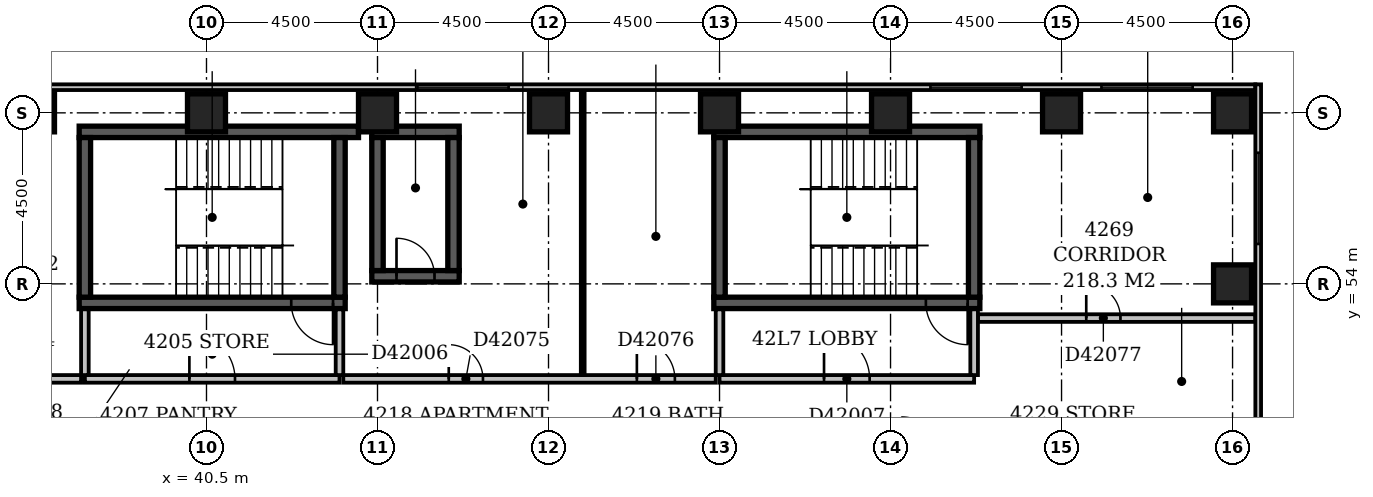
"""IFC4 building model, lengths in metres.
Left out: names, types, materials, properties, quantities, classifications, styles, units other than length and angle.
Written with IfcOpenShell. Run it as: python <this file> out.ifc"""

import sys

from ifc_helpers import new_model, si_unit, direction, frame, frame_2d, origin, origin_2d, place, context, subcontext, project, spatial, rectangle, extrude, element, fill, save


model = new_model("IFC4")
c1 = context("Model", 3, precision=1e-05, world=origin(), true_north=direction((0.0, 1.0)))
c2 = subcontext(c1, "Body", "Model", "MODEL_VIEW")
j1 = project(units=[si_unit("LENGTHUNIT", "METRE"), si_unit("PLANEANGLEUNIT", "RADIAN")], contexts=[c1])
p1 = place(None, origin())
s1 = spatial("IfcSite", under=j1, at=p1, CompositionType="ELEMENT")
p2 = place(p1, origin())
s2 = spatial("IfcBuilding", under=s1, at=p2, CompositionType="ELEMENT")
p3 = place(p2, frame((0.0, 0.0, 166.4)))
s3 = spatial("IfcBuildingStorey", under=s2, at=p3, CompositionType="ELEMENT", Elevation=166.4)
p4 = place(p3, frame((37.15, 53.5, -0.3), z_axis=(0.0, 0.0, 1.0), x_axis=(1.0, 0.0, 0.0)))
e1 = element("IfcWall", 1, at=p4, inside=s3, PredefinedType="SHEAR", context=c2, shape_type="SweptSolid", body=[
    extrude(rectangle(XDim=7.0, YDim=0.3, at=frame_2d((3.5, 0.0))), origin(), (0.0, 0.0, 1.0), 3.6),
])
p5 = place(p4, frame((5.58, 0.0, 0.3)))
e2 = element("IfcOpeningElement", 2, at=p5, cuts=e1, PredefinedType="OPENING", context=c2, shape_type="SweptSolid", body=[
    extrude(rectangle(XDim=1.1, YDim=2.1, at=frame_2d((0.55, 1.05))), frame((0.0, 0.162, 0.0), z_axis=(0.0, -1.0, 0.0), x_axis=(1.0, 0.0, 0.0)), (0.0, 0.0, 1.0), 0.324),
])
p6 = place(p3, frame((37.15, 58.0, -0.3), z_axis=(0.0, 0.0, 1.0), x_axis=(1.0, 0.0, 0.0)))
e3 = element("IfcWall", 3, at=p6, inside=s3, PredefinedType="SHEAR", context=c2, shape_type="SweptSolid", body=[
    extrude(rectangle(XDim=7.35, YDim=0.3, at=frame_2d((3.675, 0.0))), origin(), (0.0, 0.0, 1.0), 3.6),
])
for number, where, z_axis, x_axis in (
    (4, (37.3, 53.65, -0.3), (0.0, 0.0, 1.0), (0.0, 1.0, 0.0)),
    (5, (44.0, 53.65, -0.3), (0.0, 0.0, 1.0), (0.0, 1.0, 0.0)),
):
    element("IfcWall", number, at=place(p3, frame(where, z_axis=z_axis, x_axis=x_axis)), inside=s3, PredefinedType="SHEAR", context=c2, shape_type="SweptSolid", body=[
        extrude(rectangle(XDim=4.2, YDim=0.3, at=frame_2d((2.1, 0.0))), origin(), (0.0, 0.0, 1.0), 3.6),
    ])
p7 = place(p3, frame((44.85, 54.2, -0.3), z_axis=(0.0, 0.0, 1.0), x_axis=(1.0, 0.0, 0.0)))
e6 = element("IfcWall", 6, at=p7, inside=s3, PredefinedType="SHEAR", context=c2, shape_type="SweptSolid", body=[
    extrude(rectangle(XDim=2.3, YDim=0.3, at=frame_2d((1.15, 0.0))), origin(), (0.0, 0.0, 1.0), 3.6),
])
p8 = place(p7, frame((0.65, 0.0, 0.3)))
e7 = element("IfcOpeningElement", 7, at=p8, cuts=e6, PredefinedType="OPENING", context=c2, shape_type="SweptSolid", body=[
    extrude(rectangle(XDim=1.0, YDim=2.1, at=frame_2d((0.5, 1.05))), frame((0.0, 0.162, 0.0), z_axis=(0.0, -1.0, 0.0), x_axis=(1.0, 0.0, 0.0)), (0.0, 0.0, 1.0), 0.324),
])
p9 = place(p3, frame((44.85, 58.0, -0.3), z_axis=(0.0, 0.0, 1.0), x_axis=(1.0, 0.0, 0.0)))
e8 = element("IfcWall", 8, at=p9, inside=s3, PredefinedType="SHEAR", context=c2, shape_type="SweptSolid", body=[
    extrude(rectangle(XDim=2.3, YDim=0.3, at=frame_2d((1.15, 0.0))), origin(), (0.0, 0.0, 1.0), 3.6),
])
for number, where, z_axis, x_axis in (
    (9, (45.0, 54.35, -0.3), (0.0, 0.0, 1.0), (0.0, 1.0, 0.0)),
    (10, (47.0, 54.35, -0.3), (0.0, 0.0, 1.0), (0.0, 1.0, 0.0)),
):
    element("IfcWall", number, at=place(p3, frame(where, z_axis=z_axis, x_axis=x_axis)), inside=s3, PredefinedType="SHEAR", context=c2, shape_type="SweptSolid", body=[
        extrude(rectangle(XDim=3.5, YDim=0.3, at=frame_2d((1.75, 0.0))), origin(), (0.0, 0.0, 1.0), 3.6),
    ])
p10 = place(p3, frame((53.85, 53.5, -0.3), z_axis=(0.0, 0.0, 1.0), x_axis=(1.0, 0.0, 0.0)))
e11 = element("IfcWall", 11, at=p10, inside=s3, PredefinedType="SHEAR", context=c2, shape_type="SweptSolid", body=[
    extrude(rectangle(XDim=7.0, YDim=0.3, at=frame_2d((3.5, 0.0))), origin(), (0.0, 0.0, 1.0), 3.6),
])
p11 = place(p10, frame((5.58, 0.0, 0.3)))
e12 = element("IfcOpeningElement", 12, at=p11, cuts=e11, PredefinedType="OPENING", context=c2, shape_type="SweptSolid", body=[
    extrude(rectangle(XDim=1.1, YDim=2.1, at=frame_2d((0.55, 1.05))), frame((0.0, 0.162, 0.0), z_axis=(0.0, -1.0, 0.0), x_axis=(1.0, 0.0, 0.0)), (0.0, 0.0, 1.0), 0.324),
])
p12 = place(p3, frame((53.85, 58.0, -0.3), z_axis=(0.0, 0.0, 1.0), x_axis=(1.0, 0.0, 0.0)))
e13 = element("IfcWall", 13, at=p12, inside=s3, PredefinedType="SHEAR", context=c2, shape_type="SweptSolid", body=[
    extrude(rectangle(XDim=7.0, YDim=0.3, at=frame_2d((3.5, 0.0))), origin(), (0.0, 0.0, 1.0), 3.6),
])
for number, where, z_axis, x_axis in (
    (14, (54.0, 53.65, -0.3), (0.0, 0.0, 1.0), (0.0, 1.0, 0.0)),
    (15, (60.7, 53.65, -0.3), (0.0, 0.0, 1.0), (0.0, 1.0, 0.0)),
):
    element("IfcWall", number, at=place(p3, frame(where, z_axis=z_axis, x_axis=x_axis)), inside=s3, PredefinedType="SHEAR", context=c2, shape_type="SweptSolid", body=[
        extrude(rectangle(XDim=4.2, YDim=0.3, at=frame_2d((2.1, 0.0))), origin(), (0.0, 0.0, 1.0), 3.6),
    ])
for number, where, z_axis, x_axis in (
    (16, (67.5, 54.0, -0.3), (0.0, 0.0, 1.0), (1.0, 0.0, 0.0)),
    (17, (36.0, 58.5, -0.3), (0.0, 0.0, 1.0), (1.0, 0.0, 0.0)),
    (18, (40.5, 58.5, -0.3), (0.0, 0.0, 1.0), (1.0, 0.0, 0.0)),
    (19, (45.0, 58.5, -0.3), (0.0, 0.0, 1.0), (1.0, 0.0, 0.0)),
    (20, (49.5, 58.5, -0.3), (0.0, 0.0, 1.0), (1.0, 0.0, 0.0)),
    (21, (54.0, 58.5, -0.3), (0.0, 0.0, 1.0), (1.0, 0.0, 0.0)),
    (22, (58.5, 58.5, -0.3), (0.0, 0.0, 1.0), (1.0, 0.0, 0.0)),
    (23, (63.0, 58.5, -0.3), (0.0, 0.0, 1.0), (1.0, 0.0, 0.0)),
    (24, (67.5, 58.5, -0.3), (0.0, 0.0, 1.0), (1.0, 0.0, 0.0)),
):
    element("IfcColumn", number, at=place(p3, frame(where, z_axis=z_axis, x_axis=x_axis)), inside=s3, PredefinedType="COLUMN", context=c2, shape_type="SweptSolid", body=[
        extrude(rectangle(XDim=1.0, YDim=1.0, at=origin_2d()), origin(), (0.0, 0.0, 1.0), 3.6),
    ])
p13 = place(p3, frame((68.175, 35.4, 0.0), z_axis=(0.0, 0.0, 1.0), x_axis=(0.0, 1.0, 0.0)))
e25 = element("IfcWall", 25, at=p13, inside=s3, PredefinedType="STANDARD", context=c2, shape_type="SweptSolid", body=[
    extrude(rectangle(XDim=23.85, YDim=0.15, at=frame_2d((11.925, 0.0))), origin(), (0.0, 0.0, 1.0), 2.7),
])
p14 = place(p13, frame((1.65, 0.0, 0.6)))
e26 = element("IfcOpeningElement", 26, at=p14, cuts=e25, PredefinedType="OPENING", context=c2, shape_type="SweptSolid", body=[
    extrude(rectangle(XDim=2.4, YDim=1.8, at=frame_2d((1.2, 0.9))), frame((0.0, 0.087, 0.0), z_axis=(0.0, -1.0, 0.0), x_axis=(1.0, 0.0, 0.0)), (0.0, 0.0, 1.0), 0.174),
])
p15 = place(p13, frame((11.769, 0.0, 0.6)))
e27 = element("IfcOpeningElement", 27, at=p15, cuts=e25, PredefinedType="OPENING", context=c2, shape_type="SweptSolid", body=[
    extrude(rectangle(XDim=1.5, YDim=1.8, at=frame_2d((0.75, 0.9))), frame((0.0, 0.087, 0.0), z_axis=(0.0, -1.0, 0.0), x_axis=(1.0, 0.0, 0.0)), (0.0, 0.0, 1.0), 0.174),
])
p16 = place(p13, frame((19.65, 0.0, 0.6)))
e28 = element("IfcOpeningElement", 28, at=p16, cuts=e25, PredefinedType="OPENING", context=c2, shape_type="SweptSolid", body=[
    extrude(rectangle(XDim=2.4, YDim=1.8, at=frame_2d((1.2, 0.9))), frame((0.0, 0.087, 0.0), z_axis=(0.0, -1.0, 0.0), x_axis=(1.0, 0.0, 0.0)), (0.0, 0.0, 1.0), 0.174),
])
p17 = place(p3, frame((68.1, 59.175, 0.0), z_axis=(0.0, 0.0, 1.0), x_axis=(-1.0, 0.0, 0.0)))
e29 = element("IfcWall", 29, at=p17, inside=s3, PredefinedType="STANDARD", context=c2, shape_type="SweptSolid", body=[
    extrude(rectangle(XDim=68.85, YDim=0.15, at=frame_2d((34.425, 0.0))), origin(), (0.0, 0.0, 1.0), 2.7),
])
p18 = place(p17, frame((1.65, 0.0, 0.6)))
e30 = element("IfcOpeningElement", 30, at=p18, cuts=e29, PredefinedType="OPENING", context=c2, shape_type="SweptSolid", body=[
    extrude(rectangle(XDim=2.4, YDim=1.8, at=frame_2d((1.2, 0.9))), frame((0.0, 0.087, 0.0), z_axis=(0.0, -1.0, 0.0), x_axis=(1.0, 0.0, 0.0)), (0.0, 0.0, 1.0), 0.174),
])
p19 = place(p17, frame((6.15, 0.0, 0.6)))
e31 = element("IfcOpeningElement", 31, at=p19, cuts=e29, PredefinedType="OPENING", context=c2, shape_type="SweptSolid", body=[
    extrude(rectangle(XDim=2.4, YDim=1.8, at=frame_2d((1.2, 0.9))), frame((0.0, 0.087, 0.0), z_axis=(0.0, -1.0, 0.0), x_axis=(1.0, 0.0, 0.0)), (0.0, 0.0, 1.0), 0.174),
])
p20 = place(p17, frame((19.65, 0.0, 0.6)))
e32 = element("IfcOpeningElement", 32, at=p20, cuts=e29, PredefinedType="OPENING", context=c2, shape_type="SweptSolid", body=[
    extrude(rectangle(XDim=2.4, YDim=1.8, at=frame_2d((1.2, 0.9))), frame((0.0, 0.087, 0.0), z_axis=(0.0, -1.0, 0.0), x_axis=(1.0, 0.0, 0.0)), (0.0, 0.0, 1.0), 0.174),
])
p21 = place(p3, frame((37.3, 51.5, 0.0), z_axis=(0.0, 0.0, 1.0), x_axis=(1.0, 0.0, 0.0)))
e33 = element("IfcWall", 33, at=p21, inside=s3, PredefinedType="PARTITIONING", context=c2, shape_type="SweptSolid", body=[
    extrude(rectangle(XDim=6.7, YDim=0.2, at=frame_2d((3.35, 0.0))), origin(), (0.0, 0.0, 1.0), 3.3),
])
p22 = place(p21, frame((2.75, 0.0, 0.0)))
e34 = element("IfcOpeningElement", 34, at=p22, cuts=e33, PredefinedType="OPENING", context=c2, shape_type="SweptSolid", body=[
    extrude(rectangle(XDim=1.2, YDim=2.1, at=frame_2d((0.6, 1.05))), frame((0.0, 0.112, 0.0), z_axis=(0.0, -1.0, 0.0), x_axis=(1.0, 0.0, 0.0)), (0.0, 0.0, 1.0), 0.224),
])
for number, where, z_axis, x_axis in (
    (35, (44.0, 51.6, 0.0), (0.0, 0.0, 1.0), (0.0, 1.0, 0.0)),
    (36, (37.3, 51.6, 0.0), (0.0, 0.0, 1.0), (0.0, 1.0, 0.0)),
):
    element("IfcWall", number, at=place(p3, frame(where, z_axis=z_axis, x_axis=x_axis)), inside=s3, PredefinedType="PARTITIONING", context=c2, shape_type="SweptSolid", body=[
        extrude(rectangle(XDim=1.73, YDim=0.2, at=frame_2d((0.865, 0.0))), origin(), (0.0, 0.0, 1.0), 3.3),
    ])
p23 = place(p3, frame((54.0, 51.5, 0.0), z_axis=(0.0, 0.0, 1.0), x_axis=(1.0, 0.0, 0.0)))
e37 = element("IfcWall", 37, at=p23, inside=s3, PredefinedType="PARTITIONING", context=c2, shape_type="SweptSolid", body=[
    extrude(rectangle(XDim=6.7, YDim=0.2, at=frame_2d((3.35, 0.0))), origin(), (0.0, 0.0, 1.0), 3.3),
])
p24 = place(p23, frame((2.75, 0.0, 0.0)))
e38 = element("IfcOpeningElement", 38, at=p24, cuts=e37, PredefinedType="OPENING", context=c2, shape_type="SweptSolid", body=[
    extrude(rectangle(XDim=1.2, YDim=2.1, at=frame_2d((0.6, 1.05))), frame((0.0, 0.112, 0.0), z_axis=(0.0, -1.0, 0.0), x_axis=(1.0, 0.0, 0.0)), (0.0, 0.0, 1.0), 0.224),
])
p25 = place(p3, frame((60.7, 51.6, 0.0), z_axis=(0.0, 0.0, 1.0), x_axis=(0.0, 1.0, 0.0)))
e39 = element("IfcWall", 39, at=p25, inside=s3, PredefinedType="PARTITIONING", context=c2, shape_type="SweptSolid", body=[
    extrude(rectangle(XDim=1.73, YDim=0.2, at=frame_2d((0.865, 0.0))), origin(), (0.0, 0.0, 1.0), 3.3),
])
p26 = place(p3, frame((54.0, 51.6, 0.0), z_axis=(0.0, 0.0, 1.0), x_axis=(0.0, 1.0, 0.0)))
e40 = element("IfcWall", 40, at=p26, inside=s3, PredefinedType="PARTITIONING", context=c2, shape_type="SweptSolid", body=[
    extrude(rectangle(XDim=1.73, YDim=0.2, at=frame_2d((0.865, 0.0))), origin(), (0.0, 0.0, 1.0), 2.6),
])
p27 = place(p3, frame((27.9, 51.5, 0.0), z_axis=(0.0, 0.0, 1.0), x_axis=(1.0, 0.0, 0.0)))
e41 = element("IfcWall", 41, at=p27, inside=s3, PredefinedType="PARTITIONING", context=c2, shape_type="SweptSolid", body=[
    extrude(rectangle(XDim=9.3, YDim=0.2, at=frame_2d((4.65, 0.0))), origin(), (0.0, 0.0, 1.0), 3.3),
])
p28 = place(p27, frame((2.375, 0.0, 0.0)))
e42 = element("IfcOpeningElement", 42, at=p28, cuts=e41, PredefinedType="OPENING", context=c2, shape_type="SweptSolid", body=[
    extrude(rectangle(XDim=1.0, YDim=2.1, at=frame_2d((0.5, 1.05))), frame((0.0, 0.112, 0.0), z_axis=(0.0, -1.0, 0.0), x_axis=(1.0, 0.0, 0.0)), (0.0, 0.0, 1.0), 0.224),
])
p29 = place(p27, frame((7.125, 0.0, 0.0)))
e43 = element("IfcOpeningElement", 43, at=p29, cuts=e41, PredefinedType="OPENING", context=c2, shape_type="SweptSolid", body=[
    extrude(rectangle(XDim=1.0, YDim=2.1, at=frame_2d((0.5, 1.05))), frame((0.0, 0.112, 0.0), z_axis=(0.0, -1.0, 0.0), x_axis=(1.0, 0.0, 0.0)), (0.0, 0.0, 1.0), 0.224),
])
p30 = place(p3, frame((44.1, 51.5, 0.0), z_axis=(0.0, 0.0, 1.0), x_axis=(1.0, 0.0, 0.0)))
e44 = element("IfcWall", 44, at=p30, inside=s3, PredefinedType="PARTITIONING", context=c2, shape_type="SweptSolid", body=[
    extrude(rectangle(XDim=9.8, YDim=0.2, at=frame_2d((4.9, 0.0))), origin(), (0.0, 0.0, 1.0), 3.3),
])
p31 = place(p30, frame((2.775, 0.0, 0.0)))
e45 = element("IfcOpeningElement", 45, at=p31, cuts=e44, PredefinedType="OPENING", context=c2, shape_type="SweptSolid", body=[
    extrude(rectangle(XDim=0.9, YDim=2.1, at=frame_2d((0.45, 1.05))), frame((0.0, 0.112, 0.0), z_axis=(0.0, -1.0, 0.0), x_axis=(1.0, 0.0, 0.0)), (0.0, 0.0, 1.0), 0.224),
])
p32 = place(p30, frame((7.725, 0.0, 0.0)))
e46 = element("IfcOpeningElement", 46, at=p32, cuts=e44, PredefinedType="OPENING", context=c2, shape_type="SweptSolid", body=[
    extrude(rectangle(XDim=1.0, YDim=2.1, at=frame_2d((0.5, 1.05))), frame((0.0, 0.112, 0.0), z_axis=(0.0, -1.0, 0.0), x_axis=(1.0, 0.0, 0.0)), (0.0, 0.0, 1.0), 0.224),
])
p33 = place(p3, frame((50.4, 51.6, 0.0), z_axis=(0.0, 0.0, 1.0), x_axis=(0.0, 1.0, 0.0)))
e47 = element("IfcWall", 47, at=p33, inside=s3, PredefinedType="PARTITIONING", context=c2, shape_type="SweptSolid", body=[
    extrude(rectangle(XDim=7.5, YDim=0.1, at=frame_2d((3.75, 0.0))), origin(), (0.0, 0.0, 1.0), 3.3),
])
p34 = place(p3, frame((60.8, 53.1, 0.0), z_axis=(0.0, 0.0, 1.0), x_axis=(1.0, 0.0, 0.0)))
e48 = element("IfcWall", 48, at=p34, inside=s3, PredefinedType="PARTITIONING", context=c2, shape_type="SweptSolid", body=[
    extrude(rectangle(XDim=7.3, YDim=0.2, at=frame_2d((3.65, 0.0))), origin(), (0.0, 0.0, 1.0), 3.3),
])
p35 = place(p34, frame((2.85, 0.0, 0.0)))
e49 = element("IfcOpeningElement", 49, at=p35, cuts=e48, PredefinedType="OPENING", context=c2, shape_type="SweptSolid", body=[
    extrude(rectangle(XDim=0.9, YDim=2.1, at=frame_2d((0.45, 1.05))), frame((0.0, 0.112, 0.0), z_axis=(0.0, -1.0, 0.0), x_axis=(1.0, 0.0, 0.0)), (0.0, 0.0, 1.0), 0.224),
])
p36 = place(p16, origin())
e50 = element("IfcWindow", 50, at=p36, inside=s3, PartitioningType="SINGLE_PANEL", PredefinedType="WINDOW", context=c2, shape_type="SweptSolid", body=[
    extrude(rectangle(XDim=2.4, YDim=1.8, at=frame_2d((1.2, 0.9))), frame((0.0, 0.03, 0.0), z_axis=(0.0, -1.0, 0.0), x_axis=(1.0, 0.0, 0.0)), (0.0, 0.0, 1.0), 0.06),
])
fill(e28, e50)
p37 = place(p18, origin())
e51 = element("IfcWindow", 51, at=p37, inside=s3, PartitioningType="SINGLE_PANEL", PredefinedType="WINDOW", context=c2, shape_type="SweptSolid", body=[
    extrude(rectangle(XDim=2.4, YDim=1.8, at=frame_2d((1.2, 0.9))), frame((0.0, 0.03, 0.0), z_axis=(0.0, -1.0, 0.0), x_axis=(1.0, 0.0, 0.0)), (0.0, 0.0, 1.0), 0.06),
])
fill(e30, e51)
p38 = place(p19, origin())
e52 = element("IfcWindow", 52, at=p38, inside=s3, PartitioningType="SINGLE_PANEL", PredefinedType="WINDOW", context=c2, shape_type="SweptSolid", body=[
    extrude(rectangle(XDim=2.4, YDim=1.8, at=frame_2d((1.2, 0.9))), frame((0.0, 0.03, 0.0), z_axis=(0.0, -1.0, 0.0), x_axis=(1.0, 0.0, 0.0)), (0.0, 0.0, 1.0), 0.06),
])
fill(e31, e52)
p39 = place(p20, origin())
e53 = element("IfcWindow", 53, at=p39, inside=s3, PartitioningType="SINGLE_PANEL", PredefinedType="WINDOW", context=c2, shape_type="SweptSolid", body=[
    extrude(rectangle(XDim=2.4, YDim=1.8, at=frame_2d((1.2, 0.9))), frame((0.0, 0.03, 0.0), z_axis=(0.0, -1.0, 0.0), x_axis=(1.0, 0.0, 0.0)), (0.0, 0.0, 1.0), 0.06),
])
fill(e32, e53)
p40 = place(p22, origin())
e54 = element("IfcDoor", 54, at=p40, inside=s3, OperationType="SINGLE_SWING_LEFT", PredefinedType="DOOR", context=c2, shape_type="SweptSolid", body=[
    extrude(rectangle(XDim=1.2, YDim=2.1, at=frame_2d((0.6, 1.05))), frame((0.0, 0.025, 0.0), z_axis=(0.0, -1.0, 0.0), x_axis=(1.0, 0.0, 0.0)), (0.0, 0.0, 1.0), 0.05),
])
fill(e34, e54)
p41 = place(p24, origin())
e55 = element("IfcDoor", 55, at=p41, inside=s3, OperationType="SINGLE_SWING_LEFT", PredefinedType="DOOR", context=c2, shape_type="SweptSolid", body=[
    extrude(rectangle(XDim=1.2, YDim=2.1, at=frame_2d((0.6, 1.05))), frame((0.0, 0.025, 0.0), z_axis=(0.0, -1.0, 0.0), x_axis=(1.0, 0.0, 0.0)), (0.0, 0.0, 1.0), 0.05),
])
fill(e38, e55)
p42 = place(p8, origin())
e56 = element("IfcDoor", 56, at=p42, inside=s3, OperationType="SINGLE_SWING_LEFT", PredefinedType="DOOR", context=c2, shape_type="SweptSolid", body=[
    extrude(rectangle(XDim=1.0, YDim=2.1, at=frame_2d((0.5, 1.05))), frame((0.0, 0.025, 0.0), z_axis=(0.0, -1.0, 0.0), x_axis=(1.0, 0.0, 0.0)), (0.0, 0.0, 1.0), 0.05),
])
fill(e7, e56)
p43 = place(p5, origin())
e57 = element("IfcDoor", 57, at=p43, inside=s3, OperationType="SINGLE_SWING_RIGHT", PredefinedType="DOOR", context=c2, shape_type="SweptSolid", body=[
    extrude(rectangle(XDim=1.1, YDim=2.1, at=frame_2d((0.55, 1.05))), frame((0.0, 0.025, 0.0), z_axis=(0.0, -1.0, 0.0), x_axis=(1.0, 0.0, 0.0)), (0.0, 0.0, 1.0), 0.05),
])
fill(e2, e57)
p44 = place(p11, origin())
e58 = element("IfcDoor", 58, at=p44, inside=s3, OperationType="SINGLE_SWING_RIGHT", PredefinedType="DOOR", context=c2, shape_type="SweptSolid", body=[
    extrude(rectangle(XDim=1.1, YDim=2.1, at=frame_2d((0.55, 1.05))), frame((0.0, 0.025, 0.0), z_axis=(0.0, -1.0, 0.0), x_axis=(1.0, 0.0, 0.0)), (0.0, 0.0, 1.0), 0.05),
])
fill(e12, e58)
p45 = place(p31, origin())
e59 = element("IfcDoor", 59, at=p45, inside=s3, OperationType="SINGLE_SWING_LEFT", PredefinedType="DOOR", context=c2, shape_type="SweptSolid", body=[
    extrude(rectangle(XDim=0.9, YDim=2.1, at=frame_2d((0.45, 1.05))), frame((0.0, 0.025, 0.0), z_axis=(0.0, -1.0, 0.0), x_axis=(1.0, 0.0, 0.0)), (0.0, 0.0, 1.0), 0.05),
])
fill(e45, e59)
p46 = place(p32, origin())
e60 = element("IfcDoor", 60, at=p46, inside=s3, OperationType="SINGLE_SWING_LEFT", PredefinedType="DOOR", context=c2, shape_type="SweptSolid", body=[
    extrude(rectangle(XDim=1.0, YDim=2.1, at=frame_2d((0.5, 1.05))), frame((0.0, 0.025, 0.0), z_axis=(0.0, -1.0, 0.0), x_axis=(1.0, 0.0, 0.0)), (0.0, 0.0, 1.0), 0.05),
])
fill(e46, e60)
p47 = place(p35, origin())
e61 = element("IfcDoor", 61, at=p47, inside=s3, OperationType="SINGLE_SWING_LEFT", PredefinedType="DOOR", context=c2, shape_type="SweptSolid", body=[
    extrude(rectangle(XDim=0.9, YDim=2.1, at=frame_2d((0.45, 1.05))), frame((0.0, 0.025, 0.0), z_axis=(0.0, -1.0, 0.0), x_axis=(1.0, 0.0, 0.0)), (0.0, 0.0, 1.0), 0.05),
])
fill(e49, e61)
save(model, sys.argv[1])
